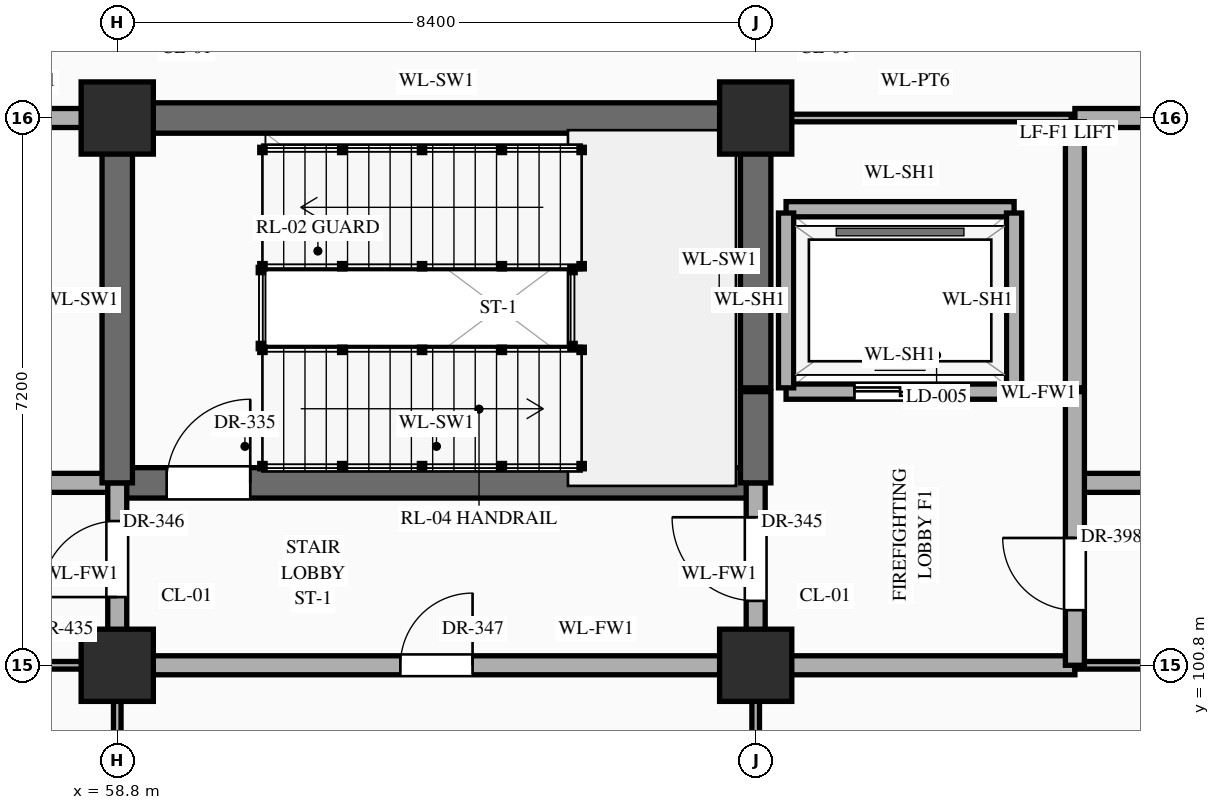
"""IFC4 building model, lengths in metres.
Left out: names, types, materials, properties, quantities, classifications, styles, units other than length and angle.
Written with IfcOpenShell. Run it as: python <this file> out.ifc"""

import sys

from ifc_helpers import new_model, si_unit, direction, frame, frame_2d, origin, origin_2d, place, context, subcontext, project, spatial, rectangle, extrude, element, fill, save


model = new_model("IFC4")
c1 = context("Model", 3, precision=1e-05, world=origin(), true_north=direction((0.0, 1.0)))
c2 = subcontext(c1, "Body", "Model", "MODEL_VIEW")
j1 = project(units=[si_unit("LENGTHUNIT", "METRE"), si_unit("PLANEANGLEUNIT", "RADIAN")], contexts=[c1])
p1 = place(None, origin())
s1 = spatial("IfcSite", under=j1, at=p1, CompositionType="ELEMENT")
p2 = place(p1, origin())
s2 = spatial("IfcBuilding", under=s1, at=p2, CompositionType="ELEMENT")
p3 = place(p2, frame((0.0, 0.0, -5.4)))
s3 = spatial("IfcBuildingStorey", under=s2, at=p3, CompositionType="ELEMENT", Elevation=-5.4)
for number, where, z_axis, x_axis in (
    (1, (58.8, 100.8, 0.0), (0.0, 0.0, 1.0), (1.0, 0.0, 0.0)),
    (2, (58.8, 108.0, 0.0), (0.0, 0.0, 1.0), (1.0, 0.0, 0.0)),
    (3, (67.2, 100.8, 0.0), (0.0, 0.0, 1.0), (1.0, 0.0, 0.0)),
    (4, (67.2, 108.0, 0.0), (0.0, 0.0, 1.0), (1.0, 0.0, 0.0)),
):
    element("IfcColumn", number, at=place(p3, frame(where, z_axis=z_axis, x_axis=x_axis)), inside=s3, PredefinedType="COLUMN", context=c2, shape_type="SweptSolid", body=[
        extrude(rectangle(XDim=0.95, YDim=0.95, at=origin_2d()), origin(), (0.0, 0.0, 1.0), 5.4),
    ])
p4 = place(p3, frame((54.6, 100.8, 0.0), z_axis=(0.0, 0.0, 1.0), x_axis=(1.0, 0.0, 0.0)))
e5 = element("IfcWall", 5, at=p4, inside=s3, PredefinedType="STANDARD", context=c2, shape_type="SweptSolid", body=[
    extrude(rectangle(XDim=4.2, YDim=0.1, at=frame_2d((2.1, 0.0))), origin(), (0.0, 0.0, 1.0), 4.25),
])
p5 = place(p4, frame((0.2, 0.0, 0.0)))
e6 = element("IfcOpeningElement", 6, at=p5, cuts=e5, PredefinedType="OPENING", context=c2, shape_type="SweptSolid", body=[
    extrude(rectangle(XDim=1.2, YDim=2.35, at=frame_2d((0.6, 1.175))), frame((0.0, 0.062, 0.0), z_axis=(0.0, -1.0, 0.0), x_axis=(1.0, 0.0, 0.0)), (0.0, 0.0, 1.0), 0.124),
])
p6 = place(p4, frame((2.083, 0.0, 0.0)))
e7 = element("IfcOpeningElement", 7, at=p6, cuts=e5, PredefinedType="OPENING", context=c2, shape_type="SweptSolid", body=[
    extrude(rectangle(XDim=1.24, YDim=2.3, at=frame_2d((0.62, 1.15))), frame((0.0, 0.062, 0.0), z_axis=(0.0, -1.0, 0.0), x_axis=(1.0, 0.0, 0.0)), (0.0, 0.0, 1.0), 0.124),
])
p7 = place(p3, frame((58.8, 100.8, 0.0), z_axis=(0.0, 0.0, 1.0), x_axis=(1.0, 0.0, 0.0)))
e8 = element("IfcWall", 8, at=p7, inside=s3, PredefinedType="STANDARD", context=c2, shape_type="SweptSolid", body=[
    extrude(rectangle(XDim=12.6, YDim=0.25, at=frame_2d((6.3, 0.0))), origin(), (0.0, 0.0, 1.0), 4.25),
])
p8 = place(p7, frame((3.725, 0.0, 0.0)))
e9 = element("IfcOpeningElement", 9, at=p8, cuts=e8, PredefinedType="OPENING", context=c2, shape_type="SweptSolid", body=[
    extrude(rectangle(XDim=0.95, YDim=2.15, at=frame_2d((0.475, 1.075))), frame((0.0, 0.137, 0.0), z_axis=(0.0, -1.0, 0.0), x_axis=(1.0, 0.0, 0.0)), (0.0, 0.0, 1.0), 0.274),
])
p9 = place(p3, frame((71.4, 100.8, 0.0), z_axis=(0.0, 0.0, 1.0), x_axis=(1.0, 0.0, 0.0)))
e10 = element("IfcWall", 10, at=p9, inside=s3, PredefinedType="STANDARD", context=c2, shape_type="SweptSolid", body=[
    extrude(rectangle(XDim=4.2, YDim=0.1, at=frame_2d((2.1, 0.0))), origin(), (0.0, 0.0, 1.0), 4.25),
])
p10 = place(p9, frame((1.282, 0.0, 0.0)))
e11 = element("IfcOpeningElement", 11, at=p10, cuts=e10, PredefinedType="OPENING", context=c2, shape_type="SweptSolid", body=[
    extrude(rectangle(XDim=1.24, YDim=2.3, at=frame_2d((0.62, 1.15))), frame((0.0, 0.062, 0.0), z_axis=(0.0, -1.0, 0.0), x_axis=(1.0, 0.0, 0.0)), (0.0, 0.0, 1.0), 0.124),
])
p11 = place(p3, frame((54.6, 103.2, 0.0), z_axis=(0.0, 0.0, 1.0), x_axis=(1.0, 0.0, 0.0)))
e12 = element("IfcWall", 12, at=p11, inside=s3, PredefinedType="STANDARD", context=c2, shape_type="SweptSolid", body=[
    extrude(rectangle(XDim=4.2, YDim=0.25, at=frame_2d((2.1, 0.0))), origin(), (0.0, 0.0, 1.0), 5.1),
])
p12 = place(p11, frame((1.6, 0.0, 0.0)))
e13 = element("IfcOpeningElement", 13, at=p12, cuts=e12, PredefinedType="OPENING", context=c2, shape_type="SweptSolid", body=[
    extrude(rectangle(XDim=1.0, YDim=2.2, at=frame_2d((0.5, 1.1))), frame((0.0, 0.137, 0.0), z_axis=(0.0, -1.0, 0.0), x_axis=(1.0, 0.0, 0.0)), (0.0, 0.0, 1.0), 0.274),
])
p13 = place(p3, frame((58.8, 103.2, 0.0), z_axis=(0.0, 0.0, 1.0), x_axis=(1.0, 0.0, 0.0)))
e14 = element("IfcWall", 14, at=p13, inside=s3, PredefinedType="SHEAR", context=c2, shape_type="SweptSolid", body=[
    extrude(rectangle(XDim=8.4, YDim=0.4, at=frame_2d((4.2, 0.0))), origin(), (0.0, 0.0, 1.0), 5.1),
])
p14 = place(p13, frame((0.65, 0.0, 0.0)))
e15 = element("IfcOpeningElement", 15, at=p14, cuts=e14, PredefinedType="OPENING", context=c2, shape_type="SweptSolid", body=[
    extrude(rectangle(XDim=1.1, YDim=2.2, at=frame_2d((0.55, 1.1))), frame((0.0, 0.212, 0.0), z_axis=(0.0, -1.0, 0.0), x_axis=(1.0, 0.0, 0.0)), (0.0, 0.0, 1.0), 0.424),
])
p15 = place(p3, frame((71.4, 103.2, 0.0), z_axis=(0.0, 0.0, 1.0), x_axis=(1.0, 0.0, 0.0)))
e16 = element("IfcWall", 16, at=p15, inside=s3, PredefinedType="STANDARD", context=c2, shape_type="SweptSolid", body=[
    extrude(rectangle(XDim=4.2, YDim=0.25, at=frame_2d((2.1, 0.0))), origin(), (0.0, 0.0, 1.0), 5.1),
])
p16 = place(p15, frame((1.55, 0.0, 0.0)))
e17 = element("IfcOpeningElement", 17, at=p16, cuts=e16, PredefinedType="OPENING", context=c2, shape_type="SweptSolid", body=[
    extrude(rectangle(XDim=1.1, YDim=2.2, at=frame_2d((0.55, 1.1))), frame((0.0, 0.137, 0.0), z_axis=(0.0, -1.0, 0.0), x_axis=(1.0, 0.0, 0.0)), (0.0, 0.0, 1.0), 0.274),
])
p17 = place(p3, frame((67.6, 104.4, 0.0), z_axis=(0.0, 0.0, 1.0), x_axis=(1.0, 0.0, 0.0)))
e18 = element("IfcWall", 18, at=p17, inside=s3, PredefinedType="STANDARD", context=c2, shape_type="SweptSolid", body=[
    extrude(rectangle(XDim=3.0, YDim=0.2, at=frame_2d((1.5, 0.0))), origin(), (0.0, 0.0, 1.0), 5.1),
])
p18 = place(p17, frame((0.9, 0.0, 0.0)))
e19 = element("IfcOpeningElement", 19, at=p18, cuts=e18, PredefinedType="OPENING", context=c2, shape_type="SweptSolid", body=[
    extrude(rectangle(XDim=1.2, YDim=2.15, at=frame_2d((0.6, 1.075))), frame((0.0, 0.112, 0.0), z_axis=(0.0, -1.0, 0.0), x_axis=(1.0, 0.0, 0.0)), (0.0, 0.0, 1.0), 0.224),
])
p19 = place(p3, frame((67.6, 106.8, 0.0), z_axis=(0.0, 0.0, 1.0), x_axis=(1.0, 0.0, 0.0)))
e20 = element("IfcWall", 20, at=p19, inside=s3, PredefinedType="STANDARD", context=c2, shape_type="SweptSolid", body=[
    extrude(rectangle(XDim=3.0, YDim=0.2, at=frame_2d((1.5, 0.0))), origin(), (0.0, 0.0, 1.0), 5.1),
])
p20 = place(p3, frame((54.6, 108.0, 0.0), z_axis=(0.0, 0.0, 1.0), x_axis=(1.0, 0.0, 0.0)))
e21 = element("IfcWall", 21, at=p20, inside=s3, PredefinedType="STANDARD", context=c2, shape_type="SweptSolid", body=[
    extrude(rectangle(XDim=4.2, YDim=0.25, at=frame_2d((2.1, 0.0))), origin(), (0.0, 0.0, 1.0), 4.25),
])
p21 = place(p20, frame((1.403, 0.0, 0.0)))
e22 = element("IfcOpeningElement", 22, at=p21, cuts=e21, PredefinedType="OPENING", context=c2, shape_type="SweptSolid", body=[
    extrude(rectangle(XDim=1.0, YDim=2.2, at=frame_2d((0.5, 1.1))), frame((0.0, 0.137, 0.0), z_axis=(0.0, -1.0, 0.0), x_axis=(1.0, 0.0, 0.0)), (0.0, 0.0, 1.0), 0.274),
])
p22 = place(p3, frame((58.8, 108.0, 0.0), z_axis=(0.0, 0.0, 1.0), x_axis=(1.0, 0.0, 0.0)))
e23 = element("IfcWall", 23, at=p22, inside=s3, PredefinedType="SHEAR", context=c2, shape_type="SweptSolid", body=[
    extrude(rectangle(XDim=8.4, YDim=0.4, at=frame_2d((4.2, 0.0))), origin(), (0.0, 0.0, 1.0), 5.1),
])
p23 = place(p3, frame((67.25, 108.0, 0.0), z_axis=(0.0, 0.0, 1.0), x_axis=(1.0, 0.0, 0.0)))
e24 = element("IfcWall", 24, at=p23, inside=s3, PredefinedType="STANDARD", context=c2, shape_type="SweptSolid", body=[
    extrude(rectangle(XDim=4.1, YDim=0.1, at=frame_2d((2.05, 0.0))), origin(), (0.0, 0.0, 1.0), 4.25),
])
p24 = place(p3, frame((71.4, 108.0, 0.0), z_axis=(0.0, 0.0, 1.0), x_axis=(1.0, 0.0, 0.0)))
e25 = element("IfcWall", 25, at=p24, inside=s3, PredefinedType="STANDARD", context=c2, shape_type="SweptSolid", body=[
    extrude(rectangle(XDim=4.2, YDim=0.25, at=frame_2d((2.1, 0.0))), origin(), (0.0, 0.0, 1.0), 4.25),
])
p25 = place(p24, frame((1.353, 0.0, 0.0)))
e26 = element("IfcOpeningElement", 26, at=p25, cuts=e25, PredefinedType="OPENING", context=c2, shape_type="SweptSolid", body=[
    extrude(rectangle(XDim=1.1, YDim=2.2, at=frame_2d((0.55, 1.1))), frame((0.0, 0.137, 0.0), z_axis=(0.0, -1.0, 0.0), x_axis=(1.0, 0.0, 0.0)), (0.0, 0.0, 1.0), 0.274),
])
p26 = place(p3, frame((58.8, 96.0, 0.0), z_axis=(0.0, 0.0, 1.0), x_axis=(0.0, 1.0, 0.0)))
e27 = element("IfcWall", 27, at=p26, inside=s3, PredefinedType="STANDARD", context=c2, shape_type="SweptSolid", body=[
    extrude(rectangle(XDim=4.8, YDim=0.1, at=frame_2d((2.4, 0.0))), origin(), (0.0, 0.0, 1.0), 4.35),
])
p27 = place(p3, frame((58.8, 100.8, 0.0), z_axis=(0.0, 0.0, 1.0), x_axis=(0.0, 1.0, 0.0)))
e28 = element("IfcWall", 28, at=p27, inside=s3, PredefinedType="STANDARD", context=c2, shape_type="SweptSolid", body=[
    extrude(rectangle(XDim=2.4, YDim=0.25, at=frame_2d((1.2, 0.0))), origin(), (0.0, 0.0, 1.0), 4.35),
])
p28 = place(p27, frame((0.897, 0.0, 0.0)))
e29 = element("IfcOpeningElement", 29, at=p28, cuts=e28, PredefinedType="OPENING", context=c2, shape_type="SweptSolid", body=[
    extrude(rectangle(XDim=1.0, YDim=2.2, at=frame_2d((0.5, 1.1))), frame((0.0, 0.137, 0.0), z_axis=(0.0, -1.0, 0.0), x_axis=(1.0, 0.0, 0.0)), (0.0, 0.0, 1.0), 0.274),
])
p29 = place(p3, frame((58.8, 103.2, 0.0), z_axis=(0.0, 0.0, 1.0), x_axis=(0.0, 1.0, 0.0)))
e30 = element("IfcWall", 30, at=p29, inside=s3, PredefinedType="SHEAR", context=c2, shape_type="SweptSolid", body=[
    extrude(rectangle(XDim=4.8, YDim=0.4, at=frame_2d((2.4, 0.0))), origin(), (0.0, 0.0, 1.0), 5.1),
])
p30 = place(p3, frame((67.2, 96.0, 0.0), z_axis=(0.0, 0.0, 1.0), x_axis=(0.0, 1.0, 0.0)))
e31 = element("IfcWall", 31, at=p30, inside=s3, PredefinedType="STANDARD", context=c2, shape_type="SweptSolid", body=[
    extrude(rectangle(XDim=4.8, YDim=0.1, at=frame_2d((2.4, 0.0))), origin(), (0.0, 0.0, 1.0), 4.35),
])
p31 = place(p3, frame((67.2, 100.8, 0.0), z_axis=(0.0, 0.0, 1.0), x_axis=(0.0, 1.0, 0.0)))
e32 = element("IfcWall", 32, at=p31, inside=s3, PredefinedType="STANDARD", context=c2, shape_type="SweptSolid", body=[
    extrude(rectangle(XDim=2.4, YDim=0.25, at=frame_2d((1.2, 0.0))), origin(), (0.0, 0.0, 1.0), 4.35),
])
p32 = place(p31, frame((0.847, 0.0, 0.0)))
e33 = element("IfcOpeningElement", 33, at=p32, cuts=e32, PredefinedType="OPENING", context=c2, shape_type="SweptSolid", body=[
    extrude(rectangle(XDim=1.1, YDim=2.2, at=frame_2d((0.55, 1.1))), frame((0.0, 0.137, 0.0), z_axis=(0.0, -1.0, 0.0), x_axis=(1.0, 0.0, 0.0)), (0.0, 0.0, 1.0), 0.274),
])
p33 = place(p3, frame((67.2, 103.2, 0.0), z_axis=(0.0, 0.0, 1.0), x_axis=(0.0, 1.0, 0.0)))
e34 = element("IfcWall", 34, at=p33, inside=s3, PredefinedType="SHEAR", context=c2, shape_type="SweptSolid", body=[
    extrude(rectangle(XDim=1.2, YDim=0.4, at=frame_2d((0.6, 0.0))), origin(), (0.0, 0.0, 1.0), 5.1),
])
p34 = place(p3, frame((67.2, 104.45, 0.0), z_axis=(0.0, 0.0, 1.0), x_axis=(0.0, 1.0, 0.0)))
e35 = element("IfcWall", 35, at=p34, inside=s3, PredefinedType="SHEAR", context=c2, shape_type="SweptSolid", body=[
    extrude(rectangle(XDim=3.5, YDim=0.4, at=frame_2d((1.75, 0.0))), origin(), (0.0, 0.0, 1.0), 5.1),
])
for number, where, z_axis, x_axis in (
    (36, (67.6, 104.45, 0.0), (0.0, 0.0, 1.0), (0.0, 1.0, 0.0)),
    (37, (70.6, 104.45, 0.0), (0.0, 0.0, 1.0), (0.0, 1.0, 0.0)),
):
    element("IfcWall", number, at=place(p3, frame(where, z_axis=z_axis, x_axis=x_axis)), inside=s3, PredefinedType="STANDARD", context=c2, shape_type="SweptSolid", body=[
        extrude(rectangle(XDim=2.3, YDim=0.2, at=frame_2d((1.15, 0.0))), origin(), (0.0, 0.0, 1.0), 5.1),
    ])
p35 = place(p3, frame((71.4, 100.8, 0.0), z_axis=(0.0, 0.0, 1.0), x_axis=(0.0, 1.0, 0.0)))
e38 = element("IfcWall", 38, at=p35, inside=s3, PredefinedType="STANDARD", context=c2, shape_type="SweptSolid", body=[
    extrude(rectangle(XDim=3.6, YDim=0.25, at=frame_2d((1.8, 0.0))), origin(), (0.0, 0.0, 1.0), 4.55),
])
p36 = place(p35, frame((0.725, 0.0, 0.0)))
e39 = element("IfcOpeningElement", 39, at=p36, cuts=e38, PredefinedType="OPENING", context=c2, shape_type="SweptSolid", body=[
    extrude(rectangle(XDim=0.95, YDim=2.15, at=frame_2d((0.475, 1.075))), frame((0.0, 0.137, 0.0), z_axis=(0.0, -1.0, 0.0), x_axis=(1.0, 0.0, 0.0)), (0.0, 0.0, 1.0), 0.274),
])
p37 = place(p3, frame((71.4, 104.45, 0.0), z_axis=(0.0, 0.0, 1.0), x_axis=(0.0, 1.0, 0.0)))
e40 = element("IfcWall", 40, at=p37, inside=s3, PredefinedType="STANDARD", context=c2, shape_type="SweptSolid", body=[
    extrude(rectangle(XDim=3.5, YDim=0.25, at=frame_2d((1.75, 0.0))), origin(), (0.0, 0.0, 1.0), 4.55),
])
p38 = place(p18, origin())
e41 = element("IfcDoor", 41, at=p38, inside=s3, OperationType="DOUBLE_DOOR_SLIDING", PredefinedType="DOOR", context=c2, shape_type="SweptSolid", body=[
    extrude(rectangle(XDim=1.2, YDim=2.15, at=frame_2d((0.6, 1.075))), frame((0.0, 0.025, 0.0), z_axis=(0.0, -1.0, 0.0), x_axis=(1.0, 0.0, 0.0)), (0.0, 0.0, 1.0), 0.05),
])
fill(e19, e41)
p39 = place(p14, origin())
e42 = element("IfcDoor", 42, at=p39, inside=s3, OperationType="SINGLE_SWING_RIGHT", PredefinedType="DOOR", context=c2, shape_type="SweptSolid", body=[
    extrude(rectangle(XDim=1.1, YDim=2.2, at=frame_2d((0.55, 1.1))), frame((0.0, 0.025, 0.0), z_axis=(0.0, -1.0, 0.0), x_axis=(1.0, 0.0, 0.0)), (0.0, 0.0, 1.0), 0.05),
])
fill(e15, e42)
p40 = place(p32, origin())
e43 = element("IfcDoor", 43, at=p40, inside=s3, OperationType="SINGLE_SWING_RIGHT", PredefinedType="DOOR", context=c2, shape_type="SweptSolid", body=[
    extrude(rectangle(XDim=1.1, YDim=2.2, at=frame_2d((0.55, 1.1))), frame((0.0, 0.025, 0.0), z_axis=(0.0, -1.0, 0.0), x_axis=(1.0, 0.0, 0.0)), (0.0, 0.0, 1.0), 0.05),
])
fill(e33, e43)
p41 = place(p28, origin())
e44 = element("IfcDoor", 44, at=p41, inside=s3, OperationType="SINGLE_SWING_LEFT", PredefinedType="DOOR", context=c2, shape_type="SweptSolid", body=[
    extrude(rectangle(XDim=1.0, YDim=2.2, at=frame_2d((0.5, 1.1))), frame((0.0, 0.025, 0.0), z_axis=(0.0, -1.0, 0.0), x_axis=(1.0, 0.0, 0.0)), (0.0, 0.0, 1.0), 0.05),
])
fill(e29, e44)
p42 = place(p8, origin())
e45 = element("IfcDoor", 45, at=p42, inside=s3, OperationType="SINGLE_SWING_RIGHT", PredefinedType="DOOR", context=c2, shape_type="SweptSolid", body=[
    extrude(rectangle(XDim=0.95, YDim=2.15, at=frame_2d((0.475, 1.075))), frame((0.0, 0.025, 0.0), z_axis=(0.0, -1.0, 0.0), x_axis=(1.0, 0.0, 0.0)), (0.0, 0.0, 1.0), 0.05),
])
fill(e9, e45)
p43 = place(p36, origin())
e46 = element("IfcDoor", 46, at=p43, inside=s3, OperationType="SINGLE_SWING_RIGHT", PredefinedType="DOOR", context=c2, shape_type="SweptSolid", body=[
    extrude(rectangle(XDim=0.95, YDim=2.15, at=frame_2d((0.475, 1.075))), frame((0.0, 0.025, 0.0), z_axis=(0.0, -1.0, 0.0), x_axis=(1.0, 0.0, 0.0)), (0.0, 0.0, 1.0), 0.05),
])
fill(e39, e46)
save(model, sys.argv[1])
